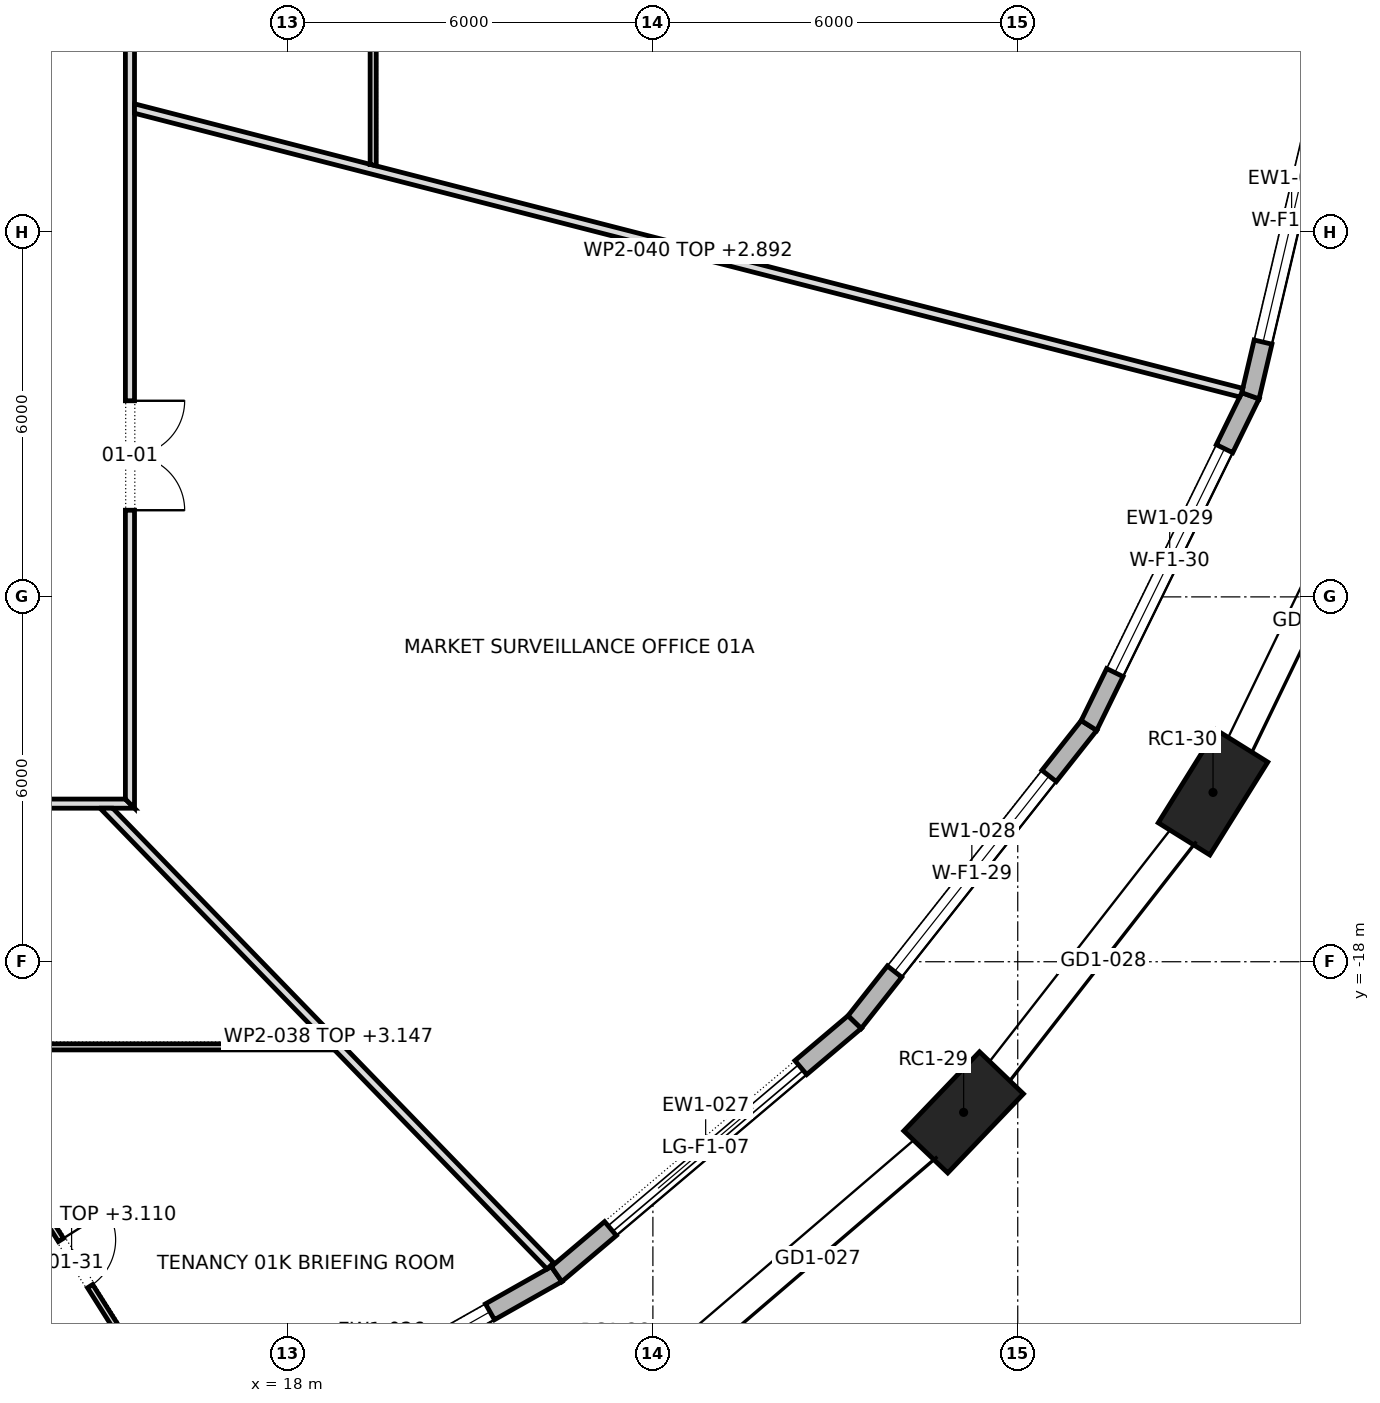
"""IFC4 building model, lengths in metres.
Left out: names, types, materials, properties, quantities, classifications, styles, units other than length and angle.
Written with IfcOpenShell. Run it as: python <this file> out.ifc"""

import sys

from ifc_helpers import new_model, si_unit, direction, frame, frame_2d, origin, origin_2d, place, context, subcontext, project, spatial, polyline, rectangle, outline, extrude, element, fill, save


model = new_model("IFC4")
c1 = context("Model", 3, precision=1e-05, world=origin(), true_north=direction((0.0, 1.0)))
c2 = subcontext(c1, "Body", "Model", "MODEL_VIEW")
j1 = project(units=[si_unit("LENGTHUNIT", "METRE"), si_unit("PLANEANGLEUNIT", "RADIAN")], contexts=[c1])
p1 = place(None, origin())
s1 = spatial("IfcSite", under=j1, at=p1, CompositionType="ELEMENT")
p2 = place(p1, origin())
s2 = spatial("IfcBuilding", under=s1, at=p2, CompositionType="ELEMENT")
p3 = place(p2, frame((0.0, 0.0, 31.9)))
s3 = spatial("IfcBuildingStorey", under=s2, at=p3, CompositionType="ELEMENT", Elevation=31.9)
for number, where, z_axis, x_axis in (
    (1, (29.11, -20.477, 0.0), (0.0, 0.0, 1.0), (0.692, 0.722, 0.0)),
    (2, (33.211, -15.216, 0.0), (0.0, 0.0, 1.0), (0.529, 0.849, 0.0)),
):
    element("IfcColumn", number, at=place(p3, frame(where, z_axis=z_axis, x_axis=x_axis)), inside=s3, PredefinedType="COLUMN", context=c2, shape_type="SweptSolid", body=[
        extrude(rectangle(XDim=1.8, YDim=1.0, at=origin_2d()), origin(), (0.0, 0.0, 1.0), 4.2),
    ])
p4 = place(p3, frame((16.656, -26.393, 0.0), z_axis=(0.0, 0.0, 1.0), x_axis=(0.8705786416, 0.492029296678, 0.0)))
e3 = element("IfcWall", 3, at=p4, inside=s3, PredefinedType="STANDARD", context=c2, shape_type="SweptSolid", body=[
    extrude(outline(polyline([(-0.013, -0.15), (6.632, -0.15), (6.604, 0.15), (0.013, 0.15), (-0.013, -0.15)])), origin(), (0.0, 0.0, 1.0), 3.9),
])
p5 = place(p4, frame((1.259, 0.0, 0.6)))
e4 = element("IfcOpeningElement", 4, at=p5, cuts=e3, PredefinedType="OPENING", context=c2, shape_type="SweptSolid", body=[
    extrude(rectangle(XDim=4.1, YDim=2.85, at=frame_2d((2.05, 1.425))), frame((0.0, 0.162, 0.0), z_axis=(0.0, -1.0, 0.0), x_axis=(1.0, 0.0, 0.0)), (0.0, 0.0, 1.0), 0.324),
])
p6 = place(p3, frame((22.417, -23.137, 0.0), z_axis=(0.0, 0.0, 1.0), x_axis=(0.763540615407, 0.645759807223, 0.0)))
e5 = element("IfcWall", 5, at=p6, inside=s3, PredefinedType="STANDARD", context=c2, shape_type="SweptSolid", body=[
    extrude(outline(polyline([(-0.014, -0.15), (6.435, -0.15), (6.405, 0.15), (0.014, 0.15), (-0.014, -0.15)])), origin(), (0.0, 0.0, 1.0), 3.9),
])
p7 = place(p6, frame((1.16, 0.0, 0.0)))
e6 = element("IfcOpeningElement", 6, at=p7, cuts=e5, PredefinedType="OPENING", context=c2, shape_type="SweptSolid", body=[
    extrude(rectangle(XDim=4.1, YDim=3.45, at=frame_2d((2.05, 1.725))), frame((0.0, 0.162, 0.0), z_axis=(0.0, -1.0, 0.0), x_axis=(1.0, 0.0, 0.0)), (0.0, 0.0, 1.0), 0.324),
])
p8 = place(p3, frame((27.318, -18.992, 0.0), z_axis=(0.0, 0.0, 1.0), x_axis=(0.619902786528, 0.784678619089, 0.0)))
e7 = element("IfcWall", 7, at=p8, inside=s3, PredefinedType="STANDARD", context=c2, shape_type="SweptSolid", body=[
    extrude(outline(polyline([(-0.015, -0.15), (6.232, -0.15), (6.199, 0.15), (0.015, 0.15), (-0.015, -0.15)])), origin(), (0.0, 0.0, 1.0), 3.9),
])
p9 = place(p8, frame((1.058, 0.0, 0.6)))
e8 = element("IfcOpeningElement", 8, at=p9, cuts=e7, PredefinedType="OPENING", context=c2, shape_type="SweptSolid", body=[
    extrude(rectangle(XDim=4.1, YDim=2.85, at=frame_2d((2.05, 1.425))), frame((0.0, 0.162, 0.0), z_axis=(0.0, -1.0, 0.0), x_axis=(1.0, 0.0, 0.0)), (0.0, 0.0, 1.0), 0.324),
])
p10 = place(p3, frame((31.171, -14.115, 0.0), z_axis=(0.0, 0.0, 1.0), x_axis=(0.439821516427, 0.898085204025, 0.0)))
e9 = element("IfcWall", 9, at=p10, inside=s3, PredefinedType="STANDARD", context=c2, shape_type="SweptSolid", body=[
    extrude(outline(polyline([(-0.016, -0.15), (6.053, -0.15), (6.02, 0.15), (0.016, 0.15), (-0.016, -0.15)])), origin(), (0.0, 0.0, 1.0), 3.9),
])
p11 = place(p10, frame((0.969, 0.0, 0.6)))
e10 = element("IfcOpeningElement", 10, at=p11, cuts=e9, PredefinedType="OPENING", context=c2, shape_type="SweptSolid", body=[
    extrude(rectangle(XDim=4.1, YDim=2.85, at=frame_2d((2.05, 1.425))), frame((0.0, 0.162, 0.0), z_axis=(0.0, -1.0, 0.0), x_axis=(1.0, 0.0, 0.0)), (0.0, 0.0, 1.0), 0.324),
])
p12 = place(p3, frame((33.826, -8.693, 0.0), z_axis=(0.0, 0.0, 1.0), x_axis=(0.228924296831, 0.973444228665, 0.0)))
e11 = element("IfcWall", 11, at=p12, inside=s3, PredefinedType="STANDARD", context=c2, shape_type="SweptSolid", body=[
    extrude(outline(polyline([(-0.017, -0.15), (5.932, -0.15), (5.897, 0.15), (0.017, 0.15), (-0.017, -0.15)])), origin(), (0.0, 0.0, 1.0), 3.9),
])
p13 = place(p12, frame((0.907, 0.0, 0.6)))
e12 = element("IfcOpeningElement", 12, at=p13, cuts=e11, PredefinedType="OPENING", context=c2, shape_type="SweptSolid", body=[
    extrude(rectangle(XDim=4.1, YDim=2.85, at=frame_2d((2.05, 1.425))), frame((0.0, 0.162, 0.0), z_axis=(0.0, -1.0, 0.0), x_axis=(1.0, 0.0, 0.0)), (0.0, 0.0, 1.0), 0.324),
])
p14 = place(p3, frame((-6.894, -19.4, 0.0), z_axis=(0.0, 0.0, 1.0), x_axis=(1.0, 0.0, 0.0)))
e13 = element("IfcWall", 13, at=p14, inside=s3, PredefinedType="PARTITIONING", context=c2, shape_type="SweptSolid", body=[
    extrude(outline(polyline([(0.0, -0.05), (1.526, -0.05), (3.052, -0.05), (4.578, -0.05), (4.578, -0.049), (4.587, -0.05), (6.454, -0.05), (8.321, -0.05), (10.188, -0.05), (12.055, -0.05), (13.922, -0.05), (13.925, -0.049), (13.925, -0.05), (15.696, -0.05), (17.468, -0.05), (19.239, -0.05), (19.243, -0.047), (19.245, -0.05), (20.848, -0.05), (22.451, -0.05), (24.054, -0.05), (25.657, -0.05), (25.657, -0.05), (25.614, -0.005), (25.614, -0.005), (25.561, 0.05), (23.819, 0.05), (22.076, 0.05), (20.334, 0.05), (18.591, 0.05), (16.849, 0.05), (15.106, 0.05), (13.364, 0.05), (13.364, 0.05), (13.264, 0.05), (13.264, 0.05), (11.781, 0.05), (10.297, 0.05), (8.814, 0.05), (8.814, 0.05), (8.714, 0.05), (8.714, 0.05), (6.978, 0.05), (5.243, 0.05), (3.507, 0.05), (1.771, 0.05), (0.036, 0.05), (0.0, -0.049), (0.0, -0.05)])), origin(), (0.0, 0.0, 1.0), 3.9),
])
p15 = place(p14, frame((6.249, 0.0, 0.0)))
e14 = element("IfcOpeningElement", 14, at=p15, cuts=e13, PredefinedType="OPENING", context=c2, shape_type="SweptSolid", body=[
    extrude(rectangle(XDim=0.9, YDim=2.1, at=frame_2d((0.45, 1.05))), frame((0.0, 0.062, 0.0), z_axis=(0.0, -1.0, 0.0), x_axis=(1.0, 0.0, 0.0)), (0.0, 0.0, 1.0), 0.124),
])
p16 = place(p14, frame((1.834, 0.0, 0.0)))
e15 = element("IfcOpeningElement", 15, at=p16, cuts=e13, PredefinedType="OPENING", context=c2, shape_type="SweptSolid", body=[
    extrude(rectangle(XDim=0.9, YDim=2.1, at=frame_2d((0.45, 1.05))), frame((0.0, 0.062, 0.0), z_axis=(0.0, -1.0, 0.0), x_axis=(1.0, 0.0, 0.0)), (0.0, 0.0, 1.0), 0.124),
])
p17 = place(p3, frame((1.87, -15.4, 0.0), z_axis=(0.0, 0.0, 1.0), x_axis=(1.0, 0.0, 0.0)))
e16 = element("IfcWall", 16, at=p17, inside=s3, PredefinedType="PARTITIONING", context=c2, shape_type="SweptSolid", body=[
    extrude(outline(polyline([(0.0, -0.075), (1.944, -0.075), (3.887, -0.075), (5.831, -0.075), (7.774, -0.075), (9.718, -0.075), (11.661, -0.075), (13.605, -0.075), (13.455, 0.075), (11.533, 0.075), (9.611, 0.075), (7.688, 0.075), (5.766, 0.075), (3.844, 0.075), (1.922, 0.075), (0.0, 0.075), (0.0, -0.075)])), origin(), (0.0, 0.0, 1.0), 3.9),
])
p18 = place(p17, frame((1.775, 0.0, 0.0)))
e17 = element("IfcOpeningElement", 17, at=p18, cuts=e16, PredefinedType="OPENING", context=c2, shape_type="SweptSolid", body=[
    extrude(rectangle(XDim=1.0, YDim=2.1, at=frame_2d((0.5, 1.05))), frame((0.0, 0.087, 0.0), z_axis=(0.0, -1.0, 0.0), x_axis=(1.0, 0.0, 0.0)), (0.0, 0.0, 1.0), 0.174),
])
p19 = place(p17, frame((8.31, 0.0, 0.0)))
e18 = element("IfcOpeningElement", 18, at=p19, cuts=e16, PredefinedType="OPENING", context=c2, shape_type="SweptSolid", body=[
    extrude(rectangle(XDim=1.0, YDim=2.1, at=frame_2d((0.5, 1.05))), frame((0.0, 0.087, 0.0), z_axis=(0.0, -1.0, 0.0), x_axis=(1.0, 0.0, 0.0)), (0.0, 0.0, 1.0), 0.174),
])
p20 = place(p3, frame((12.275, -19.424, 0.0), z_axis=(0.0, 0.0, 1.0), x_axis=(0.533945273126, -0.845519038997, 0.0)))
e19 = element("IfcWall", 19, at=p20, inside=s3, PredefinedType="PARTITIONING", context=c2, shape_type="SweptSolid", body=[
    extrude(outline(polyline([(0.0, -0.05), (1.614, -0.05), (3.228, -0.05), (4.842, -0.05), (6.456, -0.05), (8.071, -0.05), (8.083, 0.003), (8.085, 0.05), (8.085, 0.05), (6.48, 0.05), (4.876, 0.05), (3.272, 0.05), (1.667, 0.05), (0.063, 0.05), (0.0, -0.05), (0.0, -0.05)])), origin(), (0.0, 0.0, 1.0), 3.11),
])
p21 = place(p20, frame((3.727, 0.0, 0.0)))
e20 = element("IfcOpeningElement", 20, at=p21, cuts=e19, PredefinedType="OPENING", context=c2, shape_type="SweptSolid", body=[
    extrude(rectangle(XDim=0.9, YDim=2.1, at=frame_2d((0.45, 1.05))), frame((0.0, 0.062, 0.0), z_axis=(0.0, -1.0, 0.0), x_axis=(1.0, 0.0, 0.0)), (0.0, 0.0, 1.0), 0.124),
])
p22 = place(p3, frame((14.962, -15.423, 0.0), z_axis=(0.0, 0.0, 1.0), x_axis=(0.69624947088, -0.717799884578, 0.0)))
e21 = element("IfcWall", 21, at=p22, inside=s3, PredefinedType="PARTITIONING", context=c2, shape_type="SweptSolid", body=[
    extrude(outline(polyline([(0.0, -0.075), (1.799, -0.075), (3.599, -0.075), (5.398, -0.075), (5.465, -0.006), (5.537, -0.075), (7.21, -0.075), (8.884, -0.075), (10.558, -0.075), (10.558, -0.073), (10.558, 0.075), (8.823, 0.075), (7.087, 0.075), (5.352, 0.075), (3.616, 0.075), (1.881, 0.075), (0.145, 0.075), (0.0, -0.074), (0.0, -0.075)])), origin(), (0.0, 0.0, 1.0), 3.147),
])
p23 = place(p3, frame((15.4, -15.475, 0.0), z_axis=(0.0, 0.0, 1.0), x_axis=(0.0, 1.0, 0.0)))
e22 = element("IfcWall", 22, at=p23, inside=s3, PredefinedType="PARTITIONING", context=c2, shape_type="SweptSolid", body=[
    extrude(outline(polyline([(26.165, 0.075), (24.307, 0.075), (22.449, 0.075), (20.59, 0.075), (18.732, 0.075), (16.874, 0.075), (15.016, 0.075), (13.158, 0.075), (11.299, 0.075), (9.441, 0.075), (7.583, 0.075), (5.725, 0.075), (3.866, 0.075), (2.008, 0.075), (0.15, 0.075), (0.0, -0.075), (1.869, -0.075), (3.738, -0.075), (5.607, -0.075), (7.476, -0.075), (9.345, -0.075), (11.214, -0.075), (13.083, -0.075), (14.952, -0.075), (16.821, -0.075), (18.689, -0.075), (20.558, -0.075), (22.427, -0.075), (24.296, -0.075), (26.165, -0.075), (26.165, 0.075)])), origin(), (0.0, 0.0, 1.0), 3.9),
])
p24 = place(p23, frame((4.9, 0.0, 0.0)))
e23 = element("IfcOpeningElement", 23, at=p24, cuts=e22, PredefinedType="OPENING", context=c2, shape_type="SweptSolid", body=[
    extrude(rectangle(XDim=1.8, YDim=2.1, at=frame_2d((0.9, 1.05))), frame((0.0, 0.087, 0.0), z_axis=(0.0, -1.0, 0.0), x_axis=(1.0, 0.0, 0.0)), (0.0, 0.0, 1.0), 0.174),
])
p25 = place(p23, frame((14.975, 0.0, 0.0)))
e24 = element("IfcOpeningElement", 24, at=p25, cuts=e22, PredefinedType="OPENING", context=c2, shape_type="SweptSolid", body=[
    extrude(rectangle(XDim=1.0, YDim=2.1, at=frame_2d((0.5, 1.05))), frame((0.0, 0.087, 0.0), z_axis=(0.0, -1.0, 0.0), x_axis=(1.0, 0.0, 0.0)), (0.0, 0.0, 1.0), 0.174),
])
p26 = place(p23, frame((22.295, 0.0, 0.0)))
e25 = element("IfcOpeningElement", 25, at=p26, cuts=e22, PredefinedType="OPENING", context=c2, shape_type="SweptSolid", body=[
    extrude(rectangle(XDim=1.0, YDim=2.1, at=frame_2d((0.5, 1.05))), frame((0.0, 0.087, 0.0), z_axis=(0.0, -1.0, 0.0), x_axis=(1.0, 0.0, 0.0)), (0.0, 0.0, 1.0), 0.174),
])
p27 = place(p3, frame((15.457, -3.965, 0.0), z_axis=(0.0, 0.0, 1.0), x_axis=(0.968588981289, -0.248667218036, 0.0)))
e26 = element("IfcWall", 26, at=p27, inside=s3, PredefinedType="PARTITIONING", context=c2, shape_type="SweptSolid", body=[
    extrude(outline(polyline([(0.038, -0.075), (1.915, -0.075), (3.791, -0.075), (5.667, -0.075), (7.544, -0.075), (9.42, -0.075), (11.297, -0.075), (13.173, -0.075), (15.049, -0.075), (16.926, -0.075), (18.802, -0.075), (18.816, -0.008), (18.816, 0.075), (16.965, 0.075), (15.113, 0.075), (13.261, 0.075), (11.41, 0.075), (9.558, 0.075), (7.707, 0.075), (5.855, 0.075), (4.003, 0.075), (4.0, 0.074), (4.0, 0.075), (2.667, 0.075), (1.333, 0.075), (0.0, 0.075), (0.0, 0.073), (0.038, -0.075)])), origin(), (0.0, 0.0, 1.0), 2.892),
])
p28 = place(p3, frame((19.4, -4.912, 0.0), z_axis=(0.0, 0.0, 1.0), x_axis=(0.0, 1.0, 0.0)))
e27 = element("IfcWall", 27, at=p28, inside=s3, PredefinedType="PARTITIONING", context=c2, shape_type="SweptSolid", body=[
    extrude(outline(polyline([(9.824, -0.05), (9.824, -0.049), (9.799, 0.05), (7.844, 0.05), (5.889, 0.05), (3.935, 0.05), (1.98, 0.05), (0.026, 0.05), (0.0, -0.049), (0.0, -0.05), (1.965, -0.05), (3.93, -0.05), (5.895, -0.05), (7.859, -0.05), (9.824, -0.05)])), origin(), (0.0, 0.0, 1.0), 3.9),
])
p29 = place(p28, frame((2.782, 0.0, 0.0)))
e28 = element("IfcOpeningElement", 28, at=p29, cuts=e27, PredefinedType="OPENING", context=c2, shape_type="SweptSolid", body=[
    extrude(rectangle(XDim=0.9, YDim=2.1, at=frame_2d((0.45, 1.05))), frame((0.0, 0.062, 0.0), z_axis=(0.0, -1.0, 0.0), x_axis=(1.0, 0.0, 0.0)), (0.0, 0.0, 1.0), 0.124),
])
p30 = place(p5, origin())
e29 = element("IfcWindow", 29, at=p30, inside=s3, PartitioningType="TRIPLE_PANEL_VERTICAL", PredefinedType="WINDOW", context=c2, shape_type="SweptSolid", body=[
    extrude(rectangle(XDim=4.1, YDim=2.85, at=frame_2d((2.05, 1.425))), frame((0.0, 0.03, 0.0), z_axis=(0.0, -1.0, 0.0), x_axis=(1.0, 0.0, 0.0)), (0.0, 0.0, 1.0), 0.06),
])
fill(e4, e29)
p31 = place(p7, origin())
e30 = element("IfcDoor", 30, at=p31, inside=s3, OperationType="DOUBLE_DOOR_SLIDING", PredefinedType="DOOR", context=c2, shape_type="SweptSolid", body=[
    extrude(rectangle(XDim=4.1, YDim=3.45, at=frame_2d((2.05, 1.725))), frame((0.0, 0.025, 0.0), z_axis=(0.0, -1.0, 0.0), x_axis=(1.0, 0.0, 0.0)), (0.0, 0.0, 1.0), 0.05),
])
fill(e6, e30)
p32 = place(p9, origin())
e31 = element("IfcWindow", 31, at=p32, inside=s3, PartitioningType="TRIPLE_PANEL_VERTICAL", PredefinedType="WINDOW", context=c2, shape_type="SweptSolid", body=[
    extrude(rectangle(XDim=4.1, YDim=2.85, at=frame_2d((2.05, 1.425))), frame((0.0, 0.03, 0.0), z_axis=(0.0, -1.0, 0.0), x_axis=(1.0, 0.0, 0.0)), (0.0, 0.0, 1.0), 0.06),
])
fill(e8, e31)
p33 = place(p11, origin())
e32 = element("IfcWindow", 32, at=p33, inside=s3, PartitioningType="TRIPLE_PANEL_VERTICAL", PredefinedType="WINDOW", context=c2, shape_type="SweptSolid", body=[
    extrude(rectangle(XDim=4.1, YDim=2.85, at=frame_2d((2.05, 1.425))), frame((0.0, 0.03, 0.0), z_axis=(0.0, -1.0, 0.0), x_axis=(1.0, 0.0, 0.0)), (0.0, 0.0, 1.0), 0.06),
])
fill(e10, e32)
p34 = place(p13, origin())
e33 = element("IfcWindow", 33, at=p34, inside=s3, PartitioningType="TRIPLE_PANEL_VERTICAL", PredefinedType="WINDOW", context=c2, shape_type="SweptSolid", body=[
    extrude(rectangle(XDim=4.1, YDim=2.85, at=frame_2d((2.05, 1.425))), frame((0.0, 0.03, 0.0), z_axis=(0.0, -1.0, 0.0), x_axis=(1.0, 0.0, 0.0)), (0.0, 0.0, 1.0), 0.06),
])
fill(e12, e33)
p35 = place(p24, frame((1.8, 0.0, 0.0), z_axis=(0.0, 0.0, 1.0), x_axis=(-1.0, 0.0, 0.0)))
e34 = element("IfcDoor", 34, at=p35, inside=s3, OperationType="DOUBLE_DOOR_SINGLE_SWING", PredefinedType="DOOR", context=c2, shape_type="SweptSolid", body=[
    extrude(rectangle(XDim=1.8, YDim=2.1, at=frame_2d((0.9, 1.05))), frame((0.0, 0.025, 0.0), z_axis=(0.0, -1.0, 0.0), x_axis=(1.0, 0.0, 0.0)), (0.0, 0.0, 1.0), 0.05),
])
fill(e23, e34)
p36 = place(p21, origin())
e35 = element("IfcDoor", 35, at=p36, inside=s3, OperationType="SINGLE_SWING_RIGHT", PredefinedType="DOOR", context=c2, shape_type="SweptSolid", body=[
    extrude(rectangle(XDim=0.9, YDim=2.1, at=frame_2d((0.45, 1.05))), frame((0.0, 0.025, 0.0), z_axis=(0.0, -1.0, 0.0), x_axis=(1.0, 0.0, 0.0)), (0.0, 0.0, 1.0), 0.05),
])
fill(e20, e35)
save(model, sys.argv[1])
